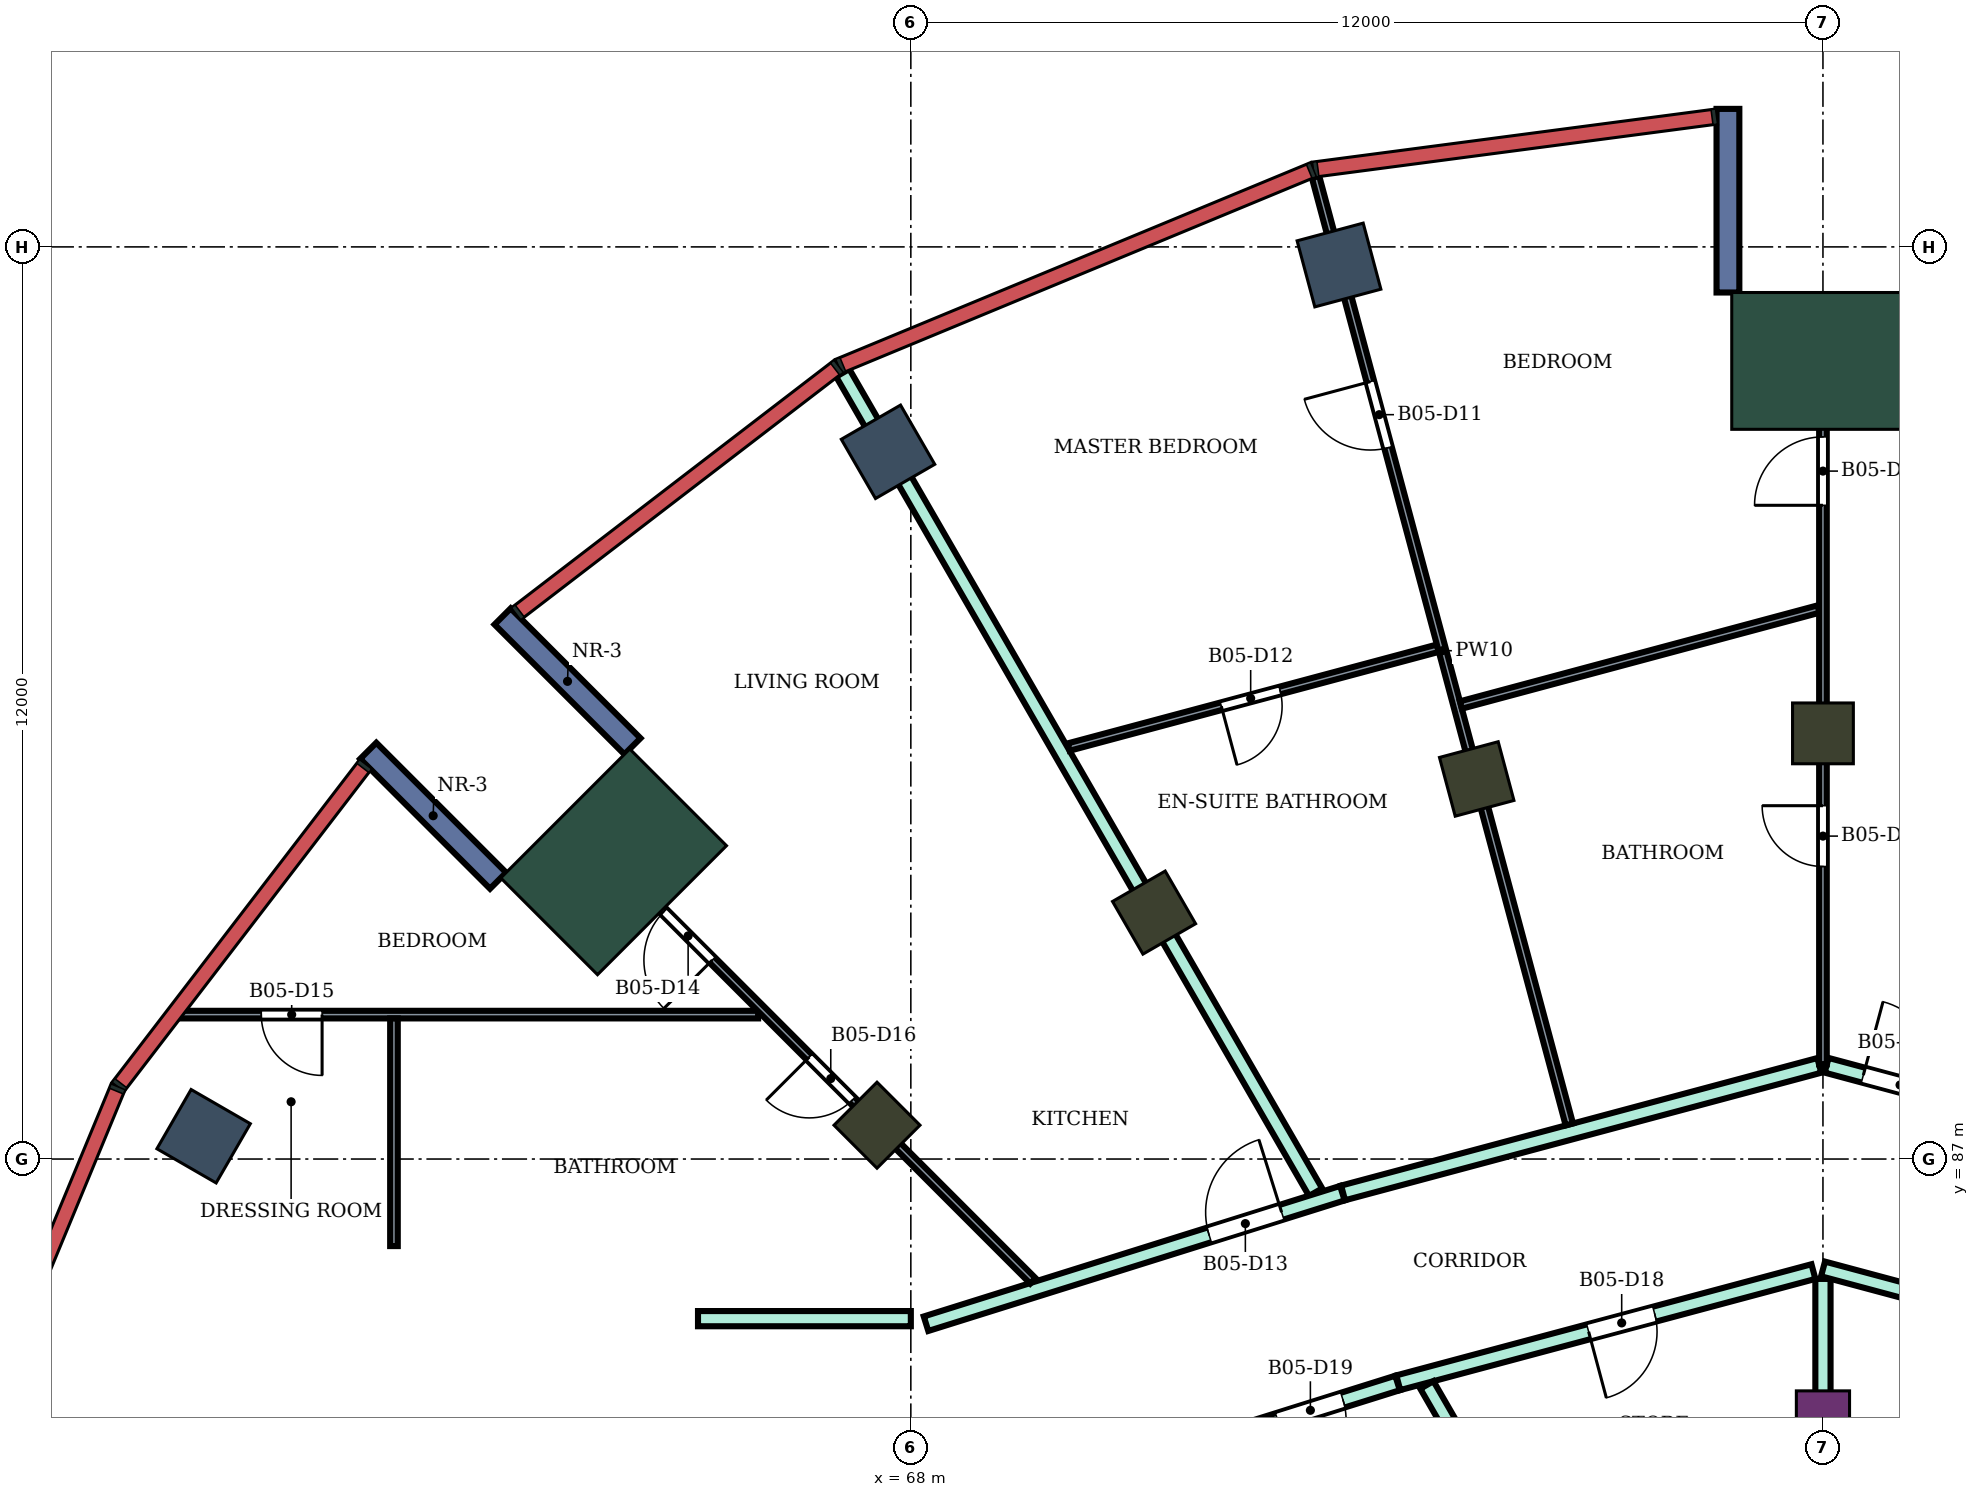
"""IFC4 building model, lengths in metres.
Left out: names, types, materials, properties, quantities, classifications, styles, units other than length and angle.
Written with IfcOpenShell. Run it as: python <this file> out.ifc"""

import sys

from ifc_helpers import new_model, si_unit, direction, frame, frame_2d, origin, origin_2d, place, context, subcontext, project, spatial, rectangle, extrude, element, fill, save


model = new_model("IFC4")
c1 = context("Model", 3, precision=1e-05, world=origin(), true_north=direction((0.0, 1.0)))
c2 = subcontext(c1, "Body", "Model", "MODEL_VIEW")
j1 = project(units=[si_unit("LENGTHUNIT", "METRE"), si_unit("PLANEANGLEUNIT", "RADIAN")], contexts=[c1])
p1 = place(None, origin())
s1 = spatial("IfcSite", under=j1, at=p1, CompositionType="ELEMENT")
p2 = place(p1, origin())
s2 = spatial("IfcBuilding", under=s1, at=p2, CompositionType="ELEMENT")
p3 = place(p2, frame((0.0, 0.0, 262.5)))
s3 = spatial("IfcBuildingStorey", under=s2, at=p3, CompositionType="ELEMENT", Elevation=262.5)
for number, where, z_axis, x_axis in (
    (1, (73.633, 98.762, 0.0), (0.0, 0.0, 1.0), (-0.259, 0.966, 0.0)),
    (2, (67.7, 96.304, 0.0), (0.0, 0.0, 1.0), (-0.5, 0.866, 0.0)),
    (3, (58.696, 87.3, 0.0), (0.0, 0.0, 1.0), (-0.866, 0.5, 0.0)),
):
    element("IfcColumn", number, at=place(p3, frame(where, z_axis=z_axis, x_axis=x_axis)), inside=s3, PredefinedType="COLUMN", context=c2, shape_type="SweptSolid", body=[
        extrude(rectangle(XDim=0.9, YDim=0.9, at=origin_2d()), origin(), (0.0, 0.0, 1.0), 4.2),
    ])
for number, where, z_axis, x_axis in (
    (4, (80.0, 92.6, 0.0), (0.0, 0.0, 1.0), (0.0, 1.0, 0.0)),
    (5, (75.445, 92.0, 0.0), (0.0, 0.0, 1.0), (-0.259, 0.966, 0.0)),
    (6, (71.2, 90.242, 0.0), (0.0, 0.0, 1.0), (-0.5, 0.866, 0.0)),
    (7, (67.555, 87.445, 0.0), (0.0, 0.0, 1.0), (-0.707, 0.707, 0.0)),
):
    element("IfcColumn", number, at=place(p3, frame(where, z_axis=z_axis, x_axis=x_axis)), inside=s3, PredefinedType="COLUMN", context=c2, shape_type="SweptSolid", body=[
        extrude(rectangle(XDim=0.8, YDim=0.8, at=origin_2d()), origin(), (0.0, 0.0, 1.0), 4.2),
    ])
p4 = place(p3, frame((80.0, 83.6, 0.0), z_axis=(0.0, 0.0, 1.0), x_axis=(0.0, 1.0, 0.0)))
e8 = element("IfcColumn", 8, at=p4, inside=s3, PredefinedType="COLUMN", context=c2, shape_type="SweptSolid", body=[
    extrude(rectangle(XDim=0.7, YDim=0.7, at=origin_2d()), origin(), (0.0, 0.0, 1.0), 4.2),
])
for number, where, z_axis, x_axis in (
    (9, (80.0, 97.5, 0.0), (0.0, 0.0, 1.0), (0.0, 1.0, 0.0)),
    (10, (64.09, 90.91, 0.0), (0.0, 0.0, 1.0), (-0.707, 0.707, 0.0)),
):
    element("IfcColumn", number, at=place(p3, frame(where, z_axis=z_axis, x_axis=x_axis)), inside=s3, PredefinedType="COLUMN", context=c2, shape_type="SweptSolid", body=[
        extrude(rectangle(XDim=1.8, YDim=2.4, at=origin_2d()), origin(), (0.0, 0.0, 1.0), 4.2),
    ])
for number, where, z_axis, x_axis in (
    (11, (78.75, 98.4, 0.0), (0.0, 0.0, 1.0), (0.0, 1.0, 0.0)),
    (12, (64.338, 92.43, 0.0), (0.0, 0.0, 1.0), (-0.707, 0.707, 0.0)),
    (13, (62.57, 90.662, 0.0), (0.0, 0.0, 1.0), (-0.707, 0.707, 0.0)),
):
    element("IfcWall", number, at=place(p3, frame(where, z_axis=z_axis, x_axis=x_axis)), inside=s3, PredefinedType="NOTDEFINED", context=c2, shape_type="SweptSolid", body=[
        extrude(rectangle(XDim=2.416, YDim=0.3, at=frame_2d((1.208, 0.0))), origin(), (0.0, 0.0, 1.0), 4.2),
    ])
p5 = place(p3, frame((65.2, 84.9, 0.0), z_axis=(0.0, 0.0, 1.0), x_axis=(1.0, 0.0, 0.0)))
e14 = element("IfcWall", 14, at=p5, inside=s3, PredefinedType="PARTITIONING", context=c2, shape_type="SweptSolid", body=[
    extrude(rectangle(XDim=2.8, YDim=0.2, at=frame_2d((1.4, 0.0))), origin(), (0.0, 0.0, 1.0), 3.75),
])
p6 = place(p3, frame((67.104, 97.343, 0.0), z_axis=(0.0, 0.0, 1.0), x_axis=(0.499894524629, -0.866086291455, 0.0)))
e15 = element("IfcWall", 15, at=p6, inside=s3, PredefinedType="PARTITIONING", context=c2, shape_type="SweptSolid", body=[
    extrude(rectangle(XDim=12.446, YDim=0.2, at=frame_2d((6.223, 0.0))), origin(), (0.0, 0.0, 1.0), 3.75),
])
p7 = place(p3, frame((68.2, 84.833, 0.0), z_axis=(0.0, 0.0, 1.0), x_axis=(0.954204109499, 0.299156342762, 0.0)))
e16 = element("IfcWall", 16, at=p7, inside=s3, PredefinedType="PARTITIONING", context=c2, shape_type="SweptSolid", body=[
    extrude(rectangle(XDim=5.74, YDim=0.2, at=frame_2d((2.87, 0.0))), origin(), (0.0, 0.0, 1.0), 3.75),
])
p8 = place(p7, frame((3.903, 0.0, 0.0)))
e17 = element("IfcOpeningElement", 17, at=p8, cuts=e16, PredefinedType="OPENING", context=c2, shape_type="SweptSolid", body=[
    extrude(rectangle(XDim=1.0, YDim=2.1, at=frame_2d((0.5, 1.05))), frame((0.0, 0.11, 0.0), z_axis=(0.0, -1.0, 0.0), x_axis=(1.0, 0.0, 0.0)), (0.0, 0.0, 1.0), 0.22),
])
p9 = place(p3, frame((72.1, 83.332, 0.0), z_axis=(0.0, 0.0, 1.0), x_axis=(0.954233106619, 0.299063836383, 0.0)))
e18 = element("IfcWall", 18, at=p9, inside=s3, PredefinedType="PARTITIONING", context=c2, shape_type="SweptSolid", body=[
    extrude(rectangle(XDim=2.414, YDim=0.2, at=frame_2d((1.207, 0.0))), origin(), (0.0, 0.0, 1.0), 3.75),
])
p10 = place(p9, frame((0.762, 0.0, 0.0)))
e19 = element("IfcOpeningElement", 19, at=p10, cuts=e18, PredefinedType="OPENING", context=c2, shape_type="SweptSolid", body=[
    extrude(rectangle(XDim=0.9, YDim=2.1, at=frame_2d((0.45, 1.05))), frame((0.0, 0.11, 0.0), z_axis=(0.0, -1.0, 0.0), x_axis=(1.0, 0.0, 0.0)), (0.0, 0.0, 1.0), 0.22),
])
p11 = place(p3, frame((73.687, 86.554, 0.0), z_axis=(0.0, 0.0, 1.0), x_axis=(0.965961994098, 0.258684027257, 0.0)))
e20 = element("IfcWall", 20, at=p11, inside=s3, PredefinedType="PARTITIONING", context=c2, shape_type="SweptSolid", body=[
    extrude(rectangle(XDim=6.486, YDim=0.2, at=frame_2d((3.243, 0.0))), origin(), (0.0, 0.0, 1.0), 3.75),
])
p12 = place(p3, frame((74.413, 84.057, 0.0), z_axis=(0.0, 0.0, 1.0), x_axis=(0.965972135939, 0.258646153246, 0.0)))
e21 = element("IfcWall", 21, at=p12, inside=s3, PredefinedType="PARTITIONING", context=c2, shape_type="SweptSolid", body=[
    extrude(rectangle(XDim=5.654, YDim=0.2, at=frame_2d((2.827, 0.0))), origin(), (0.0, 0.0, 1.0), 3.75),
])
p13 = place(p12, frame((2.593, 0.0, 0.0)))
e22 = element("IfcOpeningElement", 22, at=p13, cuts=e21, PredefinedType="OPENING", context=c2, shape_type="SweptSolid", body=[
    extrude(rectangle(XDim=0.9, YDim=2.1, at=frame_2d((0.45, 1.05))), frame((0.0, 0.11, 0.0), z_axis=(0.0, -1.0, 0.0), x_axis=(1.0, 0.0, 0.0)), (0.0, 0.0, 1.0), 0.22),
])
p14 = place(p3, frame((74.789, 84.028, 0.0), z_axis=(0.0, 0.0, 1.0), x_axis=(0.499905962189, -0.866079689733, 0.0)))
e23 = element("IfcWall", 23, at=p14, inside=s3, PredefinedType="PARTITIONING", context=c2, shape_type="SweptSolid", body=[
    extrude(rectangle(XDim=2.726, YDim=0.2, at=frame_2d((1.363, 0.0))), origin(), (0.0, 0.0, 1.0), 3.75),
])
p15 = place(p3, frame((80.0, 82.7, 0.0), z_axis=(0.0, 0.0, 1.0), x_axis=(0.0, 1.0, 0.0)))
e24 = element("IfcWall", 24, at=p15, inside=s3, PredefinedType="PARTITIONING", context=c2, shape_type="SweptSolid", body=[
    extrude(rectangle(XDim=2.723, YDim=0.2, at=frame_2d((1.362, 0.0))), origin(), (0.0, 0.0, 1.0), 3.75),
])
p16 = place(p3, frame((80.048, 88.233, 0.0), z_axis=(0.0, 0.0, 1.0), x_axis=(0.965867917069, -0.259035068625, 0.0)))
e25 = element("IfcWall", 25, at=p16, inside=s3, PredefinedType="PARTITIONING", context=c2, shape_type="SweptSolid", body=[
    extrude(rectangle(XDim=6.476, YDim=0.2, at=frame_2d((3.238, 0.0))), origin(), (0.0, 0.0, 1.0), 3.75),
])
p17 = place(p16, frame((0.5, 0.0, 0.0)))
e26 = element("IfcOpeningElement", 26, at=p17, cuts=e25, PredefinedType="OPENING", context=c2, shape_type="SweptSolid", body=[
    extrude(rectangle(XDim=1.0, YDim=2.1, at=frame_2d((0.5, 1.05))), frame((0.0, 0.11, 0.0), z_axis=(0.0, -1.0, 0.0), x_axis=(1.0, 0.0, 0.0)), (0.0, 0.0, 1.0), 0.22),
])
p18 = place(p3, frame((80.001, 85.554, 0.0), z_axis=(0.0, 0.0, 1.0), x_axis=(0.965917658836, -0.258849524528, 0.0)))
e27 = element("IfcWall", 27, at=p18, inside=s3, PredefinedType="PARTITIONING", context=c2, shape_type="SweptSolid", body=[
    extrude(rectangle(XDim=5.773, YDim=0.2, at=frame_2d((2.887, 0.0))), origin(), (0.0, 0.0, 1.0), 3.75),
])
p19 = place(p18, frame((1.991, 0.0, 0.0)))
e28 = element("IfcOpeningElement", 28, at=p19, cuts=e27, PredefinedType="OPENING", context=c2, shape_type="SweptSolid", body=[
    extrude(rectangle(XDim=1.8, YDim=2.1, at=frame_2d((0.9, 1.05))), frame((0.0, 0.11, 0.0), z_axis=(0.0, -1.0, 0.0), x_axis=(1.0, 0.0, 0.0)), (0.0, 0.0, 1.0), 0.22),
])
p20 = place(p3, frame((58.379, 88.9, 0.0), z_axis=(0.0, 0.0, 1.0), x_axis=(1.0, 0.0, 0.0)))
e29 = element("IfcWall", 29, at=p20, inside=s3, PredefinedType="PARTITIONING", context=c2, shape_type="SweptSolid", body=[
    extrude(rectangle(XDim=7.612, YDim=0.1, at=frame_2d((3.806, 0.0))), origin(), (0.0, 0.0, 1.0), 3.75),
])
p21 = place(p20, frame((1.075, 0.0, 0.0)))
e30 = element("IfcOpeningElement", 30, at=p21, cuts=e29, PredefinedType="OPENING", context=c2, shape_type="SweptSolid", body=[
    extrude(rectangle(XDim=0.8, YDim=2.1, at=frame_2d((0.4, 1.05))), frame((0.0, 0.06, 0.0), z_axis=(0.0, -1.0, 0.0), x_axis=(1.0, 0.0, 0.0)), (0.0, 0.0, 1.0), 0.12),
])
p22 = place(p3, frame((61.2, 85.855, 0.0), z_axis=(0.0, 0.0, 1.0), x_axis=(0.0, 1.0, 0.0)))
e31 = element("IfcWall", 31, at=p22, inside=s3, PredefinedType="PARTITIONING", context=c2, shape_type="SweptSolid", body=[
    extrude(rectangle(XDim=2.995, YDim=0.1, at=frame_2d((1.498, 0.0))), origin(), (0.0, 0.0, 1.0), 3.75),
])
p23 = place(p3, frame((63.598, 91.408, 0.0), z_axis=(0.0, 0.0, 1.0), x_axis=(0.706905682311, -0.707307822886, 0.0)))
e32 = element("IfcWall", 32, at=p23, inside=s3, PredefinedType="PARTITIONING", context=c2, shape_type="SweptSolid", body=[
    extrude(rectangle(XDim=8.5, YDim=0.1, at=frame_2d((4.25, 0.0))), origin(), (0.0, 0.0, 1.0), 3.75),
])
p24 = place(p23, frame((1.632, 0.0, 0.0)))
e33 = element("IfcOpeningElement", 33, at=p24, cuts=e32, PredefinedType="OPENING", context=c2, shape_type="SweptSolid", body=[
    extrude(rectangle(XDim=0.9, YDim=2.1, at=frame_2d((0.45, 1.05))), frame((0.0, 0.06, 0.0), z_axis=(0.0, -1.0, 0.0), x_axis=(1.0, 0.0, 0.0)), (0.0, 0.0, 1.0), 0.12),
])
p25 = place(p23, frame((4.336, 0.0, 0.0)))
e34 = element("IfcOpeningElement", 34, at=p25, cuts=e32, PredefinedType="OPENING", context=c2, shape_type="SweptSolid", body=[
    extrude(rectangle(XDim=0.8, YDim=2.1, at=frame_2d((0.4, 1.05))), frame((0.0, 0.06, 0.0), z_axis=(0.0, -1.0, 0.0), x_axis=(1.0, 0.0, 0.0)), (0.0, 0.0, 1.0), 0.12),
])
p26 = place(p3, frame((70.077, 92.42, 0.0), z_axis=(0.0, 0.0, 1.0), x_axis=(0.965977307762, 0.258626837138, 0.0)))
e35 = element("IfcWall", 35, at=p26, inside=s3, PredefinedType="PARTITIONING", context=c2, shape_type="SweptSolid", body=[
    extrude(rectangle(XDim=5.027, YDim=0.1, at=frame_2d((2.513, 0.0))), origin(), (0.0, 0.0, 1.0), 3.75),
])
p27 = place(p26, frame((2.078, 0.0, 0.0)))
e36 = element("IfcOpeningElement", 36, at=p27, cuts=e35, PredefinedType="OPENING", context=c2, shape_type="SweptSolid", body=[
    extrude(rectangle(XDim=0.8, YDim=2.1, at=frame_2d((0.4, 1.05))), frame((0.0, 0.06, 0.0), z_axis=(0.0, -1.0, 0.0), x_axis=(1.0, 0.0, 0.0)), (0.0, 0.0, 1.0), 0.12),
])
p28 = place(p3, frame((73.325, 99.92, 0.0), z_axis=(0.0, 0.0, 1.0), x_axis=(0.258732932804, -0.965948895896, 0.0)))
e37 = element("IfcWall", 37, at=p28, inside=s3, PredefinedType="PARTITIONING", context=c2, shape_type="SweptSolid", body=[
    extrude(rectangle(XDim=12.904, YDim=0.1, at=frame_2d((6.452, 0.0))), origin(), (0.0, 0.0, 1.0), 3.75),
])
p29 = place(p28, frame((2.787, 0.0, 0.0)))
e38 = element("IfcOpeningElement", 38, at=p29, cuts=e37, PredefinedType="OPENING", context=c2, shape_type="SweptSolid", body=[
    extrude(rectangle(XDim=0.9, YDim=2.1, at=frame_2d((0.45, 1.05))), frame((0.0, 0.06, 0.0), z_axis=(0.0, -1.0, 0.0), x_axis=(1.0, 0.0, 0.0)), (0.0, 0.0, 1.0), 0.12),
])
p30 = place(p3, frame((75.236, 92.973, 0.0), z_axis=(0.0, 0.0, 1.0), x_axis=(0.965831212389, 0.259171891173, 0.0)))
e39 = element("IfcWall", 39, at=p30, inside=s3, PredefinedType="PARTITIONING", context=c2, shape_type="SweptSolid", body=[
    extrude(rectangle(XDim=4.872, YDim=0.1, at=frame_2d((2.436, 0.0))), origin(), (0.0, 0.0, 1.0), 3.75),
])
p31 = place(p3, frame((80.0, 88.246, 0.0), z_axis=(0.0, 0.0, 1.0), x_axis=(0.0, 1.0, 0.0)))
e40 = element("IfcWall", 40, at=p31, inside=s3, PredefinedType="PARTITIONING", context=c2, shape_type="SweptSolid", body=[
    extrude(rectangle(XDim=9.954, YDim=0.1, at=frame_2d((4.977, 0.0))), origin(), (0.0, 0.0, 1.0), 3.75),
])
p32 = place(p31, frame((7.354, 0.0, 0.0)))
e41 = element("IfcOpeningElement", 41, at=p32, cuts=e40, PredefinedType="OPENING", context=c2, shape_type="SweptSolid", body=[
    extrude(rectangle(XDim=0.9, YDim=2.1, at=frame_2d((0.45, 1.05))), frame((0.0, 0.06, 0.0), z_axis=(0.0, -1.0, 0.0), x_axis=(1.0, 0.0, 0.0)), (0.0, 0.0, 1.0), 0.12),
])
p33 = place(p31, frame((2.603, 0.0, 0.0)))
e42 = element("IfcOpeningElement", 42, at=p33, cuts=e40, PredefinedType="OPENING", context=c2, shape_type="SweptSolid", body=[
    extrude(rectangle(XDim=0.8, YDim=2.1, at=frame_2d((0.4, 1.05))), frame((0.0, 0.06, 0.0), z_axis=(0.0, -1.0, 0.0), x_axis=(1.0, 0.0, 0.0)), (0.0, 0.0, 1.0), 0.12),
])
p34 = place(p17, origin())
e43 = element("IfcDoor", 43, at=p34, inside=s3, OperationType="SINGLE_SWING_LEFT", PredefinedType="DOOR", context=c2, shape_type="SweptSolid", body=[
    extrude(rectangle(XDim=1.0, YDim=2.1, at=frame_2d((0.5, 1.05))), frame((0.0, 0.025, 0.0), z_axis=(0.0, -1.0, 0.0), x_axis=(1.0, 0.0, 0.0)), (0.0, 0.0, 1.0), 0.05),
])
fill(e26, e43)
p35 = place(p32, origin())
e44 = element("IfcDoor", 44, at=p35, inside=s3, OperationType="SINGLE_SWING_LEFT", PredefinedType="DOOR", context=c2, shape_type="SweptSolid", body=[
    extrude(rectangle(XDim=0.9, YDim=2.1, at=frame_2d((0.45, 1.05))), frame((0.0, 0.025, 0.0), z_axis=(0.0, -1.0, 0.0), x_axis=(1.0, 0.0, 0.0)), (0.0, 0.0, 1.0), 0.05),
])
fill(e41, e44)
p36 = place(p33, origin())
e45 = element("IfcDoor", 45, at=p36, inside=s3, OperationType="SINGLE_SWING_RIGHT", PredefinedType="DOOR", context=c2, shape_type="SweptSolid", body=[
    extrude(rectangle(XDim=0.8, YDim=2.1, at=frame_2d((0.4, 1.05))), frame((0.0, 0.025, 0.0), z_axis=(0.0, -1.0, 0.0), x_axis=(1.0, 0.0, 0.0)), (0.0, 0.0, 1.0), 0.05),
])
fill(e42, e45)
p37 = place(p29, frame((0.9, 0.0, 0.0), z_axis=(0.0, 0.0, 1.0), x_axis=(-1.0, 0.0, 0.0)))
e46 = element("IfcDoor", 46, at=p37, inside=s3, OperationType="SINGLE_SWING_RIGHT", PredefinedType="DOOR", context=c2, shape_type="SweptSolid", body=[
    extrude(rectangle(XDim=0.9, YDim=2.1, at=frame_2d((0.45, 1.05))), frame((0.0, 0.025, 0.0), z_axis=(0.0, -1.0, 0.0), x_axis=(1.0, 0.0, 0.0)), (0.0, 0.0, 1.0), 0.05),
])
fill(e38, e46)
p38 = place(p27, frame((0.8, 0.0, 0.0), z_axis=(0.0, 0.0, 1.0), x_axis=(-1.0, 0.0, 0.0)))
e47 = element("IfcDoor", 47, at=p38, inside=s3, OperationType="SINGLE_SWING_RIGHT", PredefinedType="DOOR", context=c2, shape_type="SweptSolid", body=[
    extrude(rectangle(XDim=0.8, YDim=2.1, at=frame_2d((0.4, 1.05))), frame((0.0, 0.025, 0.0), z_axis=(0.0, -1.0, 0.0), x_axis=(1.0, 0.0, 0.0)), (0.0, 0.0, 1.0), 0.05),
])
fill(e36, e47)
p39 = place(p8, origin())
e48 = element("IfcDoor", 48, at=p39, inside=s3, OperationType="SINGLE_SWING_RIGHT", PredefinedType="DOOR", context=c2, shape_type="SweptSolid", body=[
    extrude(rectangle(XDim=1.0, YDim=2.1, at=frame_2d((0.5, 1.05))), frame((0.0, 0.025, 0.0), z_axis=(0.0, -1.0, 0.0), x_axis=(1.0, 0.0, 0.0)), (0.0, 0.0, 1.0), 0.05),
])
fill(e17, e48)
p40 = place(p24, frame((0.9, 0.0, 0.0), z_axis=(0.0, 0.0, 1.0), x_axis=(-1.0, 0.0, 0.0)))
e49 = element("IfcDoor", 49, at=p40, inside=s3, OperationType="SINGLE_SWING_LEFT", PredefinedType="DOOR", context=c2, shape_type="SweptSolid", body=[
    extrude(rectangle(XDim=0.9, YDim=2.1, at=frame_2d((0.45, 1.05))), frame((0.0, 0.025, 0.0), z_axis=(0.0, -1.0, 0.0), x_axis=(1.0, 0.0, 0.0)), (0.0, 0.0, 1.0), 0.05),
])
fill(e33, e49)
p41 = place(p21, frame((0.8, 0.0, 0.0), z_axis=(0.0, 0.0, 1.0), x_axis=(-1.0, 0.0, 0.0)))
e50 = element("IfcDoor", 50, at=p41, inside=s3, OperationType="SINGLE_SWING_LEFT", PredefinedType="DOOR", context=c2, shape_type="SweptSolid", body=[
    extrude(rectangle(XDim=0.8, YDim=2.1, at=frame_2d((0.4, 1.05))), frame((0.0, 0.025, 0.0), z_axis=(0.0, -1.0, 0.0), x_axis=(1.0, 0.0, 0.0)), (0.0, 0.0, 1.0), 0.05),
])
fill(e30, e50)
p42 = place(p25, frame((0.8, 0.0, 0.0), z_axis=(0.0, 0.0, 1.0), x_axis=(-1.0, 0.0, 0.0)))
e51 = element("IfcDoor", 51, at=p42, inside=s3, OperationType="SINGLE_SWING_RIGHT", PredefinedType="DOOR", context=c2, shape_type="SweptSolid", body=[
    extrude(rectangle(XDim=0.8, YDim=2.1, at=frame_2d((0.4, 1.05))), frame((0.0, 0.025, 0.0), z_axis=(0.0, -1.0, 0.0), x_axis=(1.0, 0.0, 0.0)), (0.0, 0.0, 1.0), 0.05),
])
fill(e34, e51)
p43 = place(p13, frame((0.9, 0.0, 0.0), z_axis=(0.0, 0.0, 1.0), x_axis=(-1.0, 0.0, 0.0)))
e52 = element("IfcDoor", 52, at=p43, inside=s3, OperationType="SINGLE_SWING_RIGHT", PredefinedType="DOOR", context=c2, shape_type="SweptSolid", body=[
    extrude(rectangle(XDim=0.9, YDim=2.1, at=frame_2d((0.45, 1.05))), frame((0.0, 0.025, 0.0), z_axis=(0.0, -1.0, 0.0), x_axis=(1.0, 0.0, 0.0)), (0.0, 0.0, 1.0), 0.05),
])
fill(e22, e52)
p44 = place(p10, frame((0.9, 0.0, 0.0), z_axis=(0.0, 0.0, 1.0), x_axis=(-1.0, 0.0, 0.0)))
e53 = element("IfcDoor", 53, at=p44, inside=s3, OperationType="SINGLE_SWING_RIGHT", PredefinedType="DOOR", context=c2, shape_type="SweptSolid", body=[
    extrude(rectangle(XDim=0.9, YDim=2.1, at=frame_2d((0.45, 1.05))), frame((0.0, 0.025, 0.0), z_axis=(0.0, -1.0, 0.0), x_axis=(1.0, 0.0, 0.0)), (0.0, 0.0, 1.0), 0.05),
])
fill(e19, e53)
save(model, sys.argv[1])
